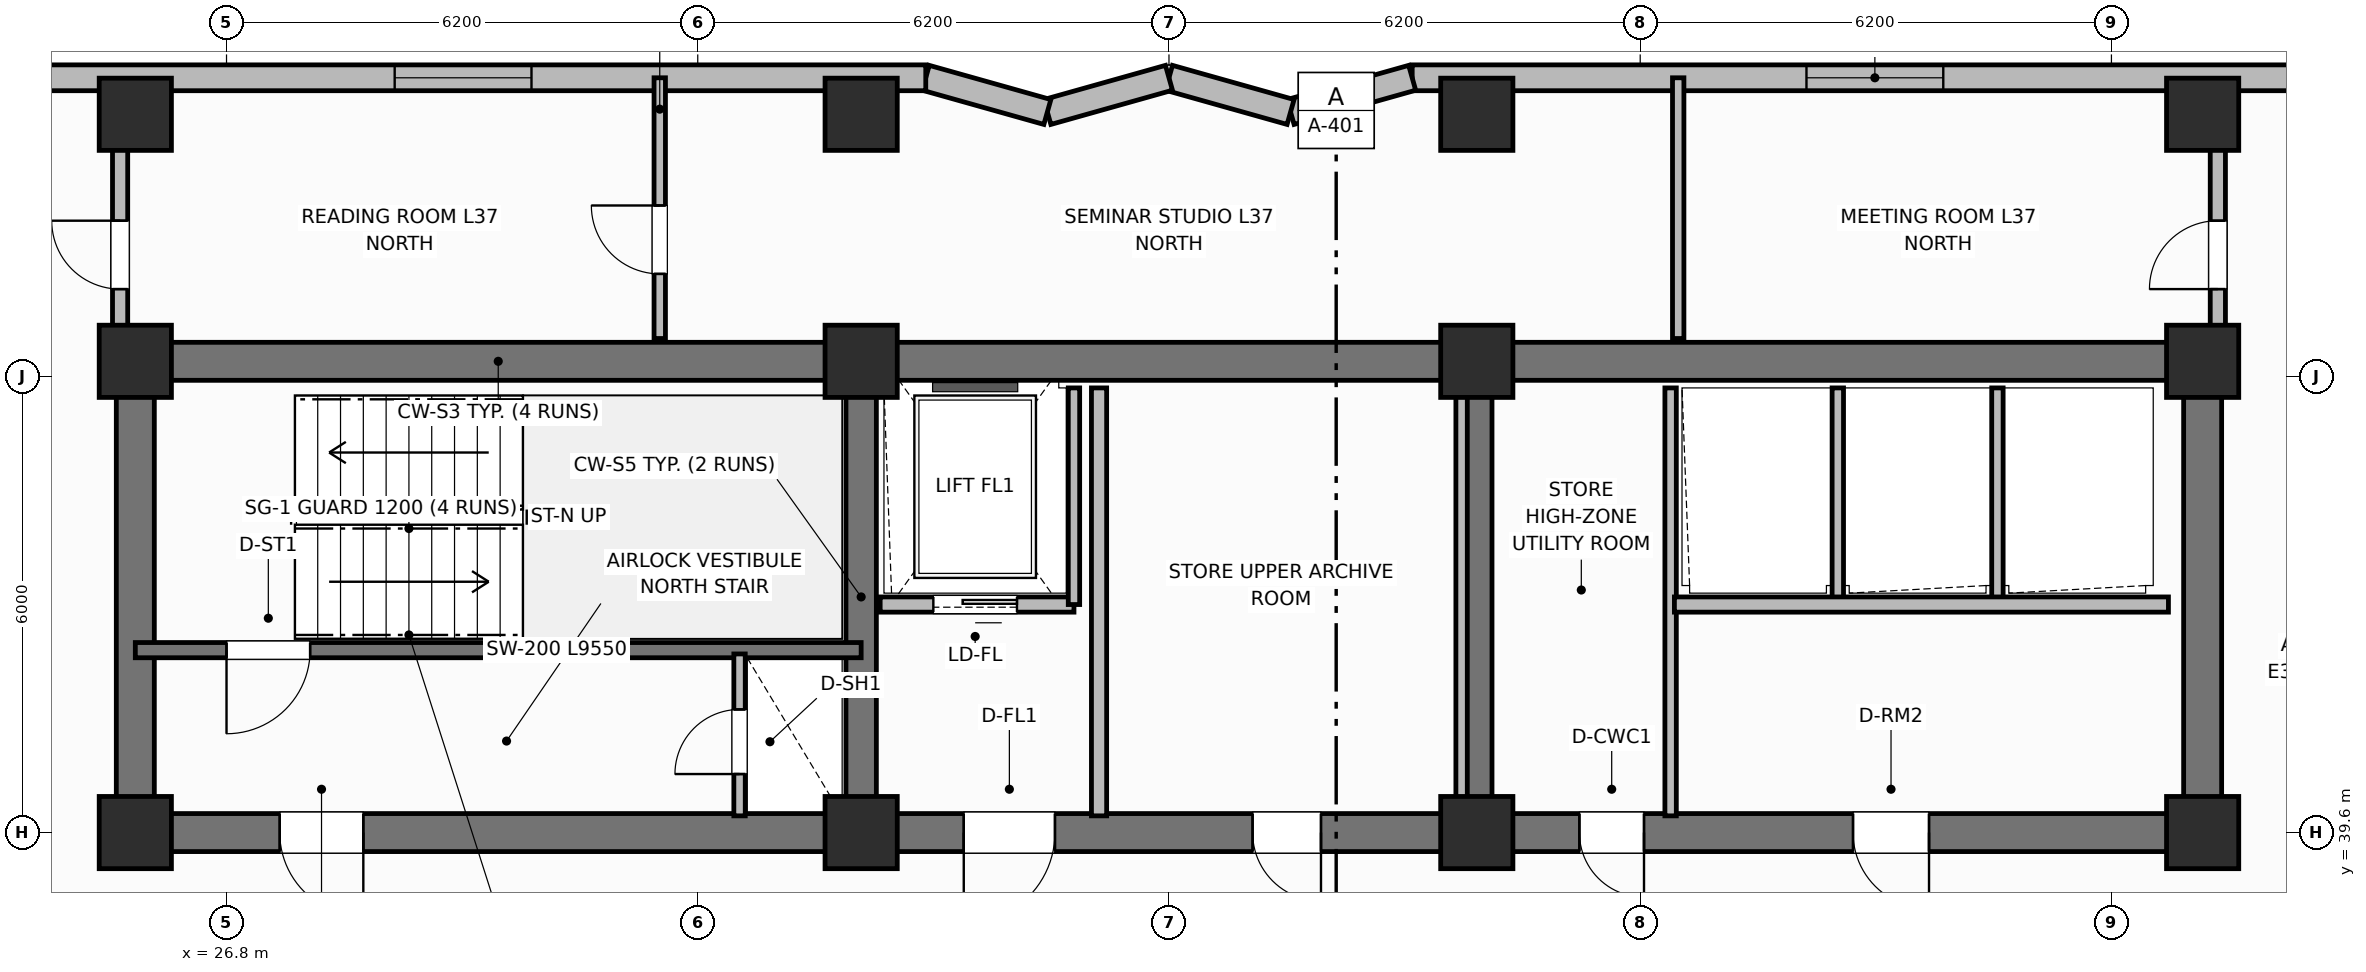
"""IFC4 building model, lengths in metres.
Left out: names, types, materials, properties, quantities, classifications, styles, units other than length and angle.
Written with IfcOpenShell. Run it as: python <this file> out.ifc"""

import sys

from ifc_helpers import new_model, si_unit, direction, frame, frame_2d, origin, origin_2d, place, context, subcontext, project, spatial, rectangle, extrude, element, fill, save


model = new_model("IFC4")
c1 = context("Model", 3, precision=1e-05, world=origin(), true_north=direction((0.0, 1.0)))
c2 = subcontext(c1, "Body", "Model", "MODEL_VIEW")
j1 = project(units=[si_unit("LENGTHUNIT", "METRE"), si_unit("PLANEANGLEUNIT", "RADIAN")], contexts=[c1])
p1 = place(None, origin())
s1 = spatial("IfcSite", under=j1, at=p1, CompositionType="ELEMENT")
p2 = place(p1, origin())
s2 = spatial("IfcBuilding", under=s1, at=p2, CompositionType="ELEMENT")
p3 = place(p2, frame((0.0, 0.0, 151.5)))
s3 = spatial("IfcBuildingStorey", under=s2, at=p3, CompositionType="ELEMENT", Elevation=151.5)
p4 = place(p3, frame((25.6, 45.8, 0.0), z_axis=(0.0, 0.0, 1.0), x_axis=(1.0, 0.0, 0.0)))
e1 = element("IfcWall", 1, at=p4, inside=s3, PredefinedType="SHEAR", context=c2, shape_type="SweptSolid", body=[
    extrude(rectangle(XDim=27.2, YDim=0.5, at=frame_2d((13.6, 0.0))), origin(), (0.0, 0.0, 1.0), 3.7),
])
for number, where, z_axis, x_axis in (
    (2, (25.6, 39.85, 0.0), (0.0, 0.0, 1.0), (0.0, 1.0, 0.0)),
    (3, (52.8, 39.85, 0.0), (0.0, 0.0, 1.0), (0.0, 1.0, 0.0)),
):
    element("IfcWall", number, at=place(p3, frame(where, z_axis=z_axis, x_axis=x_axis)), inside=s3, PredefinedType="SHEAR", context=c2, shape_type="SweptSolid", body=[
        extrude(rectangle(XDim=5.7, YDim=0.5, at=frame_2d((2.85, 0.0))), origin(), (0.0, 0.0, 1.0), 3.7),
    ])
p5 = place(p3, frame((52.8, 39.6, 0.0), z_axis=(0.0, 0.0, 1.0), x_axis=(-1.0, 0.0, 0.0)))
e4 = element("IfcWall", 4, at=p5, inside=s3, PredefinedType="SHEAR", context=c2, shape_type="SweptSolid", body=[
    extrude(rectangle(XDim=27.2, YDim=0.5, at=frame_2d((13.6, 0.0))), origin(), (0.0, 0.0, 1.0), 3.7),
])
p6 = place(p5, frame((24.2, 0.0, 0.0)))
e5 = element("IfcOpeningElement", 5, at=p6, cuts=e4, PredefinedType="OPENING", context=c2, shape_type="SweptSolid", body=[
    extrude(rectangle(XDim=1.1, YDim=2.15, at=frame_2d((0.55, 1.075))), frame((0.0, 0.26, 0.0), z_axis=(0.0, -1.0, 0.0), x_axis=(1.0, 0.0, 0.0)), (0.0, 0.0, 1.0), 0.52),
])
p7 = place(p5, frame((15.1, 0.0, 0.0)))
e6 = element("IfcOpeningElement", 6, at=p7, cuts=e4, PredefinedType="OPENING", context=c2, shape_type="SweptSolid", body=[
    extrude(rectangle(XDim=1.2, YDim=2.15, at=frame_2d((0.6, 1.075))), frame((0.0, 0.26, 0.0), z_axis=(0.0, -1.0, 0.0), x_axis=(1.0, 0.0, 0.0)), (0.0, 0.0, 1.0), 0.52),
])
p8 = place(p5, frame((11.6, 0.0, 0.0)))
e7 = element("IfcOpeningElement", 7, at=p8, cuts=e4, PredefinedType="OPENING", context=c2, shape_type="SweptSolid", body=[
    extrude(rectangle(XDim=0.9, YDim=2.1, at=frame_2d((0.45, 1.05))), frame((0.0, 0.26, 0.0), z_axis=(0.0, -1.0, 0.0), x_axis=(1.0, 0.0, 0.0)), (0.0, 0.0, 1.0), 0.52),
])
p9 = place(p5, frame((7.35, 0.0, 0.0)))
e8 = element("IfcOpeningElement", 8, at=p9, cuts=e4, PredefinedType="OPENING", context=c2, shape_type="SweptSolid", body=[
    extrude(rectangle(XDim=0.85, YDim=2.1, at=frame_2d((0.425, 1.05))), frame((0.0, 0.26, 0.0), z_axis=(0.0, -1.0, 0.0), x_axis=(1.0, 0.0, 0.0)), (0.0, 0.0, 1.0), 0.52),
])
p10 = place(p5, frame((3.6, 0.0, 0.0)))
e9 = element("IfcOpeningElement", 9, at=p10, cuts=e4, PredefinedType="OPENING", context=c2, shape_type="SweptSolid", body=[
    extrude(rectangle(XDim=1.0, YDim=2.15, at=frame_2d((0.5, 1.075))), frame((0.0, 0.26, 0.0), z_axis=(0.0, -1.0, 0.0), x_axis=(1.0, 0.0, 0.0)), (0.0, 0.0, 1.0), 0.52),
])
for number, where, z_axis, x_axis in (
    (10, (35.15, 39.85, 0.0), (0.0, 0.0, 1.0), (0.0, 1.0, 0.0)),
    (11, (43.25, 39.85, 0.0), (0.0, 0.0, 1.0), (0.0, 1.0, 0.0)),
):
    element("IfcWall", number, at=place(p3, frame(where, z_axis=z_axis, x_axis=x_axis)), inside=s3, PredefinedType="SHEAR", context=c2, shape_type="SweptSolid", body=[
        extrude(rectangle(XDim=5.7, YDim=0.4, at=frame_2d((2.85, 0.0))), origin(), (0.0, 0.0, 1.0), 3.7),
    ])
for number, where, z_axis, x_axis in (
    (12, (25.6, 39.6, 0.0), (0.0, 0.0, 1.0), (1.0, 0.0, 0.0)),
    (13, (25.6, 45.8, 0.0), (0.0, 0.0, 1.0), (1.0, 0.0, 0.0)),
    (14, (35.15, 39.6, 0.0), (0.0, 0.0, 1.0), (1.0, 0.0, 0.0)),
    (15, (35.15, 45.8, 0.0), (0.0, 0.0, 1.0), (1.0, 0.0, 0.0)),
    (16, (43.25, 39.6, 0.0), (0.0, 0.0, 1.0), (1.0, 0.0, 0.0)),
    (17, (43.25, 45.8, 0.0), (0.0, 0.0, 1.0), (1.0, 0.0, 0.0)),
    (18, (52.8, 39.6, 0.0), (0.0, 0.0, 1.0), (1.0, 0.0, 0.0)),
    (19, (52.8, 45.8, 0.0), (0.0, 0.0, 1.0), (1.0, 0.0, 0.0)),
    (20, (25.6, 49.05, 0.0), (0.0, 0.0, 1.0), (1.0, 0.0, 0.0)),
    (21, (35.15, 49.05, 0.0), (0.0, 0.0, 1.0), (1.0, 0.0, 0.0)),
    (22, (43.25, 49.05, 0.0), (0.0, 0.0, 1.0), (1.0, 0.0, 0.0)),
    (23, (52.8, 49.05, 0.0), (0.0, 0.0, 1.0), (1.0, 0.0, 0.0)),
):
    element("IfcColumn", number, at=place(p3, frame(where, z_axis=z_axis, x_axis=x_axis)), inside=s3, PredefinedType="COLUMN", context=c2, shape_type="SweptSolid", body=[
        extrude(rectangle(XDim=0.95, YDim=0.95, at=origin_2d()), origin(), (0.0, 0.0, 1.0), 3.7),
    ])
p11 = place(p3, frame((58.2, 49.53, 0.0), z_axis=(0.0, 0.0, 1.0), x_axis=(-1.0, 0.0, 0.0)))
e24 = element("IfcWall", 24, at=p11, inside=s3, PredefinedType="SOLIDWALL", context=c2, shape_type="SweptSolid", body=[
    extrude(rectangle(XDim=15.8, YDim=0.34, at=frame_2d((7.9, 0.0))), origin(), (0.0, 0.0, 1.0), 2.72),
])
p12 = place(p11, frame((8.812, 0.0, 0.75)))
e25 = element("IfcOpeningElement", 25, at=p12, cuts=e24, PredefinedType="OPENING", context=c2, shape_type="SweptSolid", body=[
    extrude(rectangle(XDim=1.8, YDim=1.85, at=frame_2d((0.9, 0.925))), frame((0.0, 0.18, 0.0), z_axis=(0.0, -1.0, 0.0), x_axis=(1.0, 0.0, 0.0)), (0.0, 0.0, 1.0), 0.36),
])
p13 = place(p3, frame((42.4, 49.53, 0.0), z_axis=(0.0, 0.0, 1.0), x_axis=(-0.962652136636, -0.270741322725, 0.0)))
e26 = element("IfcWall", 26, at=p13, inside=s3, PredefinedType="SOLIDWALL", context=c2, shape_type="SweptSolid", body=[
    extrude(rectangle(XDim=1.662, YDim=0.34, at=frame_2d((0.831, 0.0))), origin(), (0.0, 0.0, 1.0), 2.72),
])
p14 = place(p3, frame((40.8, 49.08, 0.0), z_axis=(0.0, 0.0, 1.0), x_axis=(-0.962662902433, 0.270703040766, 0.0)))
e27 = element("IfcWall", 27, at=p14, inside=s3, PredefinedType="SOLIDWALL", context=c2, shape_type="SweptSolid", body=[
    extrude(rectangle(XDim=1.662, YDim=0.34, at=frame_2d((0.831, 0.0))), origin(), (0.0, 0.0, 1.0), 2.72),
])
p15 = place(p3, frame((39.2, 49.53, 0.0), z_axis=(0.0, 0.0, 1.0), x_axis=(-0.962652136636, -0.270741322725, 0.0)))
e28 = element("IfcWall", 28, at=p15, inside=s3, PredefinedType="SOLIDWALL", context=c2, shape_type="SweptSolid", body=[
    extrude(rectangle(XDim=1.662, YDim=0.34, at=frame_2d((0.831, 0.0))), origin(), (0.0, 0.0, 1.0), 2.72),
])
p16 = place(p3, frame((37.6, 49.08, 0.0), z_axis=(0.0, 0.0, 1.0), x_axis=(-0.962662902433, 0.270703040766, 0.0)))
e29 = element("IfcWall", 29, at=p16, inside=s3, PredefinedType="SOLIDWALL", context=c2, shape_type="SweptSolid", body=[
    extrude(rectangle(XDim=1.662, YDim=0.34, at=frame_2d((0.831, 0.0))), origin(), (0.0, 0.0, 1.0), 2.72),
])
p17 = place(p3, frame((36.0, 49.53, 0.0), z_axis=(0.0, 0.0, 1.0), x_axis=(-1.0, 0.0, 0.0)))
e30 = element("IfcWall", 30, at=p17, inside=s3, PredefinedType="SOLIDWALL", context=c2, shape_type="SweptSolid", body=[
    extrude(rectangle(XDim=15.8, YDim=0.34, at=frame_2d((7.9, 0.0))), origin(), (0.0, 0.0, 1.0), 2.72),
])
p18 = place(p17, frame((5.188, 0.0, 0.75)))
e31 = element("IfcOpeningElement", 31, at=p18, cuts=e30, PredefinedType="OPENING", context=c2, shape_type="SweptSolid", body=[
    extrude(rectangle(XDim=1.8, YDim=1.85, at=frame_2d((0.9, 0.925))), frame((0.0, 0.18, 0.0), z_axis=(0.0, -1.0, 0.0), x_axis=(1.0, 0.0, 0.0)), (0.0, 0.0, 1.0), 0.36),
])
p19 = place(p3, frame((35.15, 42.0, 0.0), z_axis=(0.0, 0.0, 1.0), x_axis=(-1.0, 0.0, 0.0)))
e32 = element("IfcWall", 32, at=p19, inside=s3, PredefinedType="SHEAR", context=c2, shape_type="SweptSolid", body=[
    extrude(rectangle(XDim=9.55, YDim=0.2, at=frame_2d((4.775, 0.0))), origin(), (0.0, 0.0, 1.0), 3.7),
])
p20 = place(p19, frame((7.25, 0.0, 0.0)))
e33 = element("IfcOpeningElement", 33, at=p20, cuts=e32, PredefinedType="OPENING", context=c2, shape_type="SweptSolid", body=[
    extrude(rectangle(XDim=1.1, YDim=2.15, at=frame_2d((0.55, 1.075))), frame((0.0, 0.11, 0.0), z_axis=(0.0, -1.0, 0.0), x_axis=(1.0, 0.0, 0.0)), (0.0, 0.0, 1.0), 0.22),
])
p21 = place(p3, frame((33.55, 39.82, 0.0), z_axis=(0.0, 0.0, 1.0), x_axis=(0.0, 1.0, 0.0)))
e34 = element("IfcWall", 34, at=p21, inside=s3, PredefinedType="PARTITIONING", context=c2, shape_type="SweptSolid", body=[
    extrude(rectangle(XDim=2.13, YDim=0.15, at=frame_2d((1.065, 0.0))), origin(), (0.0, 0.0, 1.0), 2.55),
])
p22 = place(p21, frame((0.55, 0.0, 0.0)))
e35 = element("IfcOpeningElement", 35, at=p22, cuts=e34, PredefinedType="OPENING", context=c2, shape_type="SweptSolid", body=[
    extrude(rectangle(XDim=0.85, YDim=2.05, at=frame_2d((0.425, 1.025))), frame((0.0, 0.085, 0.0), z_axis=(0.0, -1.0, 0.0), x_axis=(1.0, 0.0, 0.0)), (0.0, 0.0, 1.0), 0.17),
])
p23 = place(p3, frame((37.95, 42.6, 0.0), z_axis=(0.0, 0.0, 1.0), x_axis=(-1.0, 0.0, 0.0)))
e36 = element("IfcWall", 36, at=p23, inside=s3, PredefinedType="PARTITIONING", context=c2, shape_type="SweptSolid", body=[
    extrude(rectangle(XDim=2.55, YDim=0.2, at=frame_2d((1.275, 0.0))), origin(), (0.0, 0.0, 1.0), 2.32),
])
p24 = place(p23, frame((0.75, 0.0, 0.0)))
e37 = element("IfcOpeningElement", 37, at=p24, cuts=e36, PredefinedType="OPENING", context=c2, shape_type="SweptSolid", body=[
    extrude(rectangle(XDim=1.1, YDim=2.15, at=frame_2d((0.55, 1.075))), frame((0.0, 0.11, 0.0), z_axis=(0.0, -1.0, 0.0), x_axis=(1.0, 0.0, 0.0)), (0.0, 0.0, 1.0), 0.22),
])
p25 = place(p3, frame((37.95, 42.6, 0.0), z_axis=(0.0, 0.0, 1.0), x_axis=(0.0, 1.0, 0.0)))
e38 = element("IfcWall", 38, at=p25, inside=s3, PredefinedType="PARTITIONING", context=c2, shape_type="SweptSolid", body=[
    extrude(rectangle(XDim=2.85, YDim=0.15, at=frame_2d((1.425, 0.0))), origin(), (0.0, 0.0, 1.0), 2.55),
])
p26 = place(p3, frame((38.28, 39.82, 0.0), z_axis=(0.0, 0.0, 1.0), x_axis=(0.0, 1.0, 0.0)))
e39 = element("IfcWall", 39, at=p26, inside=s3, PredefinedType="PARTITIONING", context=c2, shape_type="SweptSolid", body=[
    extrude(rectangle(XDim=5.63, YDim=0.2, at=frame_2d((2.815, 0.0))), origin(), (0.0, 0.0, 1.0), 2.55),
])
for number, where, z_axis, x_axis in (
    (40, (43.05, 39.82, 0.0), (0.0, 0.0, 1.0), (0.0, 1.0, 0.0)),
    (41, (45.8, 39.82, 0.0), (0.0, 0.0, 1.0), (0.0, 1.0, 0.0)),
):
    element("IfcWall", number, at=place(p3, frame(where, z_axis=z_axis, x_axis=x_axis)), inside=s3, PredefinedType="PARTITIONING", context=c2, shape_type="SweptSolid", body=[
        extrude(rectangle(XDim=5.63, YDim=0.15, at=frame_2d((2.815, 0.0))), origin(), (0.0, 0.0, 1.0), 2.55),
    ])
for number, where, z_axis, x_axis in (
    (42, (48.0, 42.65, 0.0), (0.0, 0.0, 1.0), (0.0, 1.0, 0.0)),
    (43, (50.1, 42.65, 0.0), (0.0, 0.0, 1.0), (0.0, 1.0, 0.0)),
):
    element("IfcWall", number, at=place(p3, frame(where, z_axis=z_axis, x_axis=x_axis)), inside=s3, PredefinedType="PARTITIONING", context=c2, shape_type="SweptSolid", body=[
        extrude(rectangle(XDim=2.8, YDim=0.15, at=frame_2d((1.4, 0.0))), origin(), (0.0, 0.0, 1.0), 2.55),
    ])
p27 = place(p3, frame((52.35, 42.6, 0.0), z_axis=(0.0, 0.0, 1.0), x_axis=(-1.0, 0.0, 0.0)))
e44 = element("IfcWall", 44, at=p27, inside=s3, PredefinedType="PARTITIONING", context=c2, shape_type="SweptSolid", body=[
    extrude(rectangle(XDim=6.5, YDim=0.2, at=frame_2d((3.25, 0.0))), origin(), (0.0, 0.0, 1.0), 2.55),
])
p28 = place(p3, frame((32.5, 46.1, 0.0), z_axis=(0.0, 0.0, 1.0), x_axis=(0.0, 1.0, 0.0)))
e45 = element("IfcWall", 45, at=p28, inside=s3, PredefinedType="PARTITIONING", context=c2, shape_type="SweptSolid", body=[
    extrude(rectangle(XDim=3.43, YDim=0.15, at=frame_2d((1.715, 0.0))), origin(), (0.0, 0.0, 1.0), 2.55),
])
p29 = place(p28, frame((0.85, 0.0, 0.0)))
e46 = element("IfcOpeningElement", 46, at=p29, cuts=e45, PredefinedType="OPENING", context=c2, shape_type="SweptSolid", body=[
    extrude(rectangle(XDim=0.9, YDim=2.1, at=frame_2d((0.45, 1.05))), frame((0.0, 0.085, 0.0), z_axis=(0.0, -1.0, 0.0), x_axis=(1.0, 0.0, 0.0)), (0.0, 0.0, 1.0), 0.17),
])
p30 = place(p3, frame((45.9, 46.1, 0.0), z_axis=(0.0, 0.0, 1.0), x_axis=(0.0, 1.0, 0.0)))
e47 = element("IfcWall", 47, at=p30, inside=s3, PredefinedType="PARTITIONING", context=c2, shape_type="SweptSolid", body=[
    extrude(rectangle(XDim=3.43, YDim=0.15, at=frame_2d((1.715, 0.0))), origin(), (0.0, 0.0, 1.0), 2.55),
])
p31 = place(p3, frame((25.4, 46.1, 0.0), z_axis=(0.0, 0.0, 1.0), x_axis=(0.0, 1.0, 0.0)))
e48 = element("IfcWall", 48, at=p31, inside=s3, PredefinedType="PARTITIONING", context=c2, shape_type="SweptSolid", body=[
    extrude(rectangle(XDim=2.83, YDim=0.2, at=frame_2d((1.415, 0.0))), origin(), (0.0, 0.0, 1.0), 2.55),
])
p32 = place(p31, frame((0.65, 0.0, 0.0)))
e49 = element("IfcOpeningElement", 49, at=p32, cuts=e48, PredefinedType="OPENING", context=c2, shape_type="SweptSolid", body=[
    extrude(rectangle(XDim=0.9, YDim=2.1, at=frame_2d((0.45, 1.05))), frame((0.0, 0.11, 0.0), z_axis=(0.0, -1.0, 0.0), x_axis=(1.0, 0.0, 0.0)), (0.0, 0.0, 1.0), 0.22),
])
p33 = place(p3, frame((53.0, 46.1, 0.0), z_axis=(0.0, 0.0, 1.0), x_axis=(0.0, 1.0, 0.0)))
e50 = element("IfcWall", 50, at=p33, inside=s3, PredefinedType="PARTITIONING", context=c2, shape_type="SweptSolid", body=[
    extrude(rectangle(XDim=2.83, YDim=0.2, at=frame_2d((1.415, 0.0))), origin(), (0.0, 0.0, 1.0), 2.55),
])
p34 = place(p33, frame((0.65, 0.0, 0.0)))
e51 = element("IfcOpeningElement", 51, at=p34, cuts=e50, PredefinedType="OPENING", context=c2, shape_type="SweptSolid", body=[
    extrude(rectangle(XDim=0.9, YDim=2.1, at=frame_2d((0.45, 1.05))), frame((0.0, 0.11, 0.0), z_axis=(0.0, -1.0, 0.0), x_axis=(1.0, 0.0, 0.0)), (0.0, 0.0, 1.0), 0.22),
])
p35 = place(p12, origin())
e52 = element("IfcWindow", 52, at=p35, inside=s3, PartitioningType="SINGLE_PANEL", PredefinedType="WINDOW", context=c2, shape_type="SweptSolid", body=[
    extrude(rectangle(XDim=1.8, YDim=1.85, at=frame_2d((0.9, 0.925))), frame((0.0, 0.03, 0.0), z_axis=(0.0, -1.0, 0.0), x_axis=(1.0, 0.0, 0.0)), (0.0, 0.0, 1.0), 0.06),
])
fill(e25, e52)
p36 = place(p18, origin())
e53 = element("IfcWindow", 53, at=p36, inside=s3, PartitioningType="SINGLE_PANEL", PredefinedType="WINDOW", context=c2, shape_type="SweptSolid", body=[
    extrude(rectangle(XDim=1.8, YDim=1.85, at=frame_2d((0.9, 0.925))), frame((0.0, 0.03, 0.0), z_axis=(0.0, -1.0, 0.0), x_axis=(1.0, 0.0, 0.0)), (0.0, 0.0, 1.0), 0.06),
])
fill(e31, e53)
p37 = place(p20, origin())
e54 = element("IfcDoor", 54, at=p37, inside=s3, OperationType="SINGLE_SWING_RIGHT", PredefinedType="DOOR", context=c2, shape_type="SweptSolid", body=[
    extrude(rectangle(XDim=1.1, YDim=2.15, at=frame_2d((0.55, 1.075))), frame((0.0, 0.025, 0.0), z_axis=(0.0, -1.0, 0.0), x_axis=(1.0, 0.0, 0.0)), (0.0, 0.0, 1.0), 0.05),
])
fill(e33, e54)
p38 = place(p22, origin())
e55 = element("IfcDoor", 55, at=p38, inside=s3, OperationType="SINGLE_SWING_LEFT", PredefinedType="TRAPDOOR", context=c2, shape_type="SweptSolid", body=[
    extrude(rectangle(XDim=0.85, YDim=2.05, at=frame_2d((0.425, 1.025))), frame((0.0, 0.025, 0.0), z_axis=(0.0, -1.0, 0.0), x_axis=(1.0, 0.0, 0.0)), (0.0, 0.0, 1.0), 0.05),
])
fill(e35, e55)
p39 = place(p24, origin())
e56 = element("IfcDoor", 56, at=p39, inside=s3, OperationType="SLIDING_TO_LEFT", PredefinedType="DOOR", context=c2, shape_type="SweptSolid", body=[
    extrude(rectangle(XDim=1.1, YDim=2.15, at=frame_2d((0.55, 1.075))), frame((0.0, 0.025, 0.0), z_axis=(0.0, -1.0, 0.0), x_axis=(1.0, 0.0, 0.0)), (0.0, 0.0, 1.0), 0.05),
])
fill(e37, e56)
p40 = place(p29, origin())
e57 = element("IfcDoor", 57, at=p40, inside=s3, OperationType="SINGLE_SWING_RIGHT", PredefinedType="DOOR", context=c2, shape_type="SweptSolid", body=[
    extrude(rectangle(XDim=0.9, YDim=2.1, at=frame_2d((0.45, 1.05))), frame((0.0, 0.025, 0.0), z_axis=(0.0, -1.0, 0.0), x_axis=(1.0, 0.0, 0.0)), (0.0, 0.0, 1.0), 0.05),
])
fill(e46, e57)
p41 = place(p32, origin())
e58 = element("IfcDoor", 58, at=p41, inside=s3, OperationType="SINGLE_SWING_RIGHT", PredefinedType="DOOR", context=c2, shape_type="SweptSolid", body=[
    extrude(rectangle(XDim=0.9, YDim=2.1, at=frame_2d((0.45, 1.05))), frame((0.0, 0.025, 0.0), z_axis=(0.0, -1.0, 0.0), x_axis=(1.0, 0.0, 0.0)), (0.0, 0.0, 1.0), 0.05),
])
fill(e49, e58)
p42 = place(p34, origin())
e59 = element("IfcDoor", 59, at=p42, inside=s3, OperationType="SINGLE_SWING_LEFT", PredefinedType="DOOR", context=c2, shape_type="SweptSolid", body=[
    extrude(rectangle(XDim=0.9, YDim=2.1, at=frame_2d((0.45, 1.05))), frame((0.0, 0.025, 0.0), z_axis=(0.0, -1.0, 0.0), x_axis=(1.0, 0.0, 0.0)), (0.0, 0.0, 1.0), 0.05),
])
fill(e51, e59)
p43 = place(p6, origin())
e60 = element("IfcDoor", 60, at=p43, inside=s3, OperationType="SINGLE_SWING_LEFT", PredefinedType="DOOR", context=c2, shape_type="SweptSolid", body=[
    extrude(rectangle(XDim=1.1, YDim=2.15, at=frame_2d((0.55, 1.075))), frame((0.0, 0.025, 0.0), z_axis=(0.0, -1.0, 0.0), x_axis=(1.0, 0.0, 0.0)), (0.0, 0.0, 1.0), 0.05),
])
fill(e5, e60)
p44 = place(p7, origin())
e61 = element("IfcDoor", 61, at=p44, inside=s3, OperationType="SINGLE_SWING_RIGHT", PredefinedType="DOOR", context=c2, shape_type="SweptSolid", body=[
    extrude(rectangle(XDim=1.2, YDim=2.15, at=frame_2d((0.6, 1.075))), frame((0.0, 0.025, 0.0), z_axis=(0.0, -1.0, 0.0), x_axis=(1.0, 0.0, 0.0)), (0.0, 0.0, 1.0), 0.05),
])
fill(e6, e61)
p45 = place(p8, origin())
e62 = element("IfcDoor", 62, at=p45, inside=s3, OperationType="SINGLE_SWING_LEFT", PredefinedType="DOOR", context=c2, shape_type="SweptSolid", body=[
    extrude(rectangle(XDim=0.9, YDim=2.1, at=frame_2d((0.45, 1.05))), frame((0.0, 0.025, 0.0), z_axis=(0.0, -1.0, 0.0), x_axis=(1.0, 0.0, 0.0)), (0.0, 0.0, 1.0), 0.05),
])
fill(e7, e62)
p46 = place(p9, origin())
e63 = element("IfcDoor", 63, at=p46, inside=s3, OperationType="SINGLE_SWING_LEFT", PredefinedType="DOOR", context=c2, shape_type="SweptSolid", body=[
    extrude(rectangle(XDim=0.85, YDim=2.1, at=frame_2d((0.425, 1.05))), frame((0.0, 0.025, 0.0), z_axis=(0.0, -1.0, 0.0), x_axis=(1.0, 0.0, 0.0)), (0.0, 0.0, 1.0), 0.05),
])
fill(e8, e63)
p47 = place(p10, origin())
e64 = element("IfcDoor", 64, at=p47, inside=s3, OperationType="SINGLE_SWING_LEFT", PredefinedType="DOOR", context=c2, shape_type="SweptSolid", body=[
    extrude(rectangle(XDim=1.0, YDim=2.15, at=frame_2d((0.5, 1.075))), frame((0.0, 0.025, 0.0), z_axis=(0.0, -1.0, 0.0), x_axis=(1.0, 0.0, 0.0)), (0.0, 0.0, 1.0), 0.05),
])
fill(e9, e64)
save(model, sys.argv[1])
